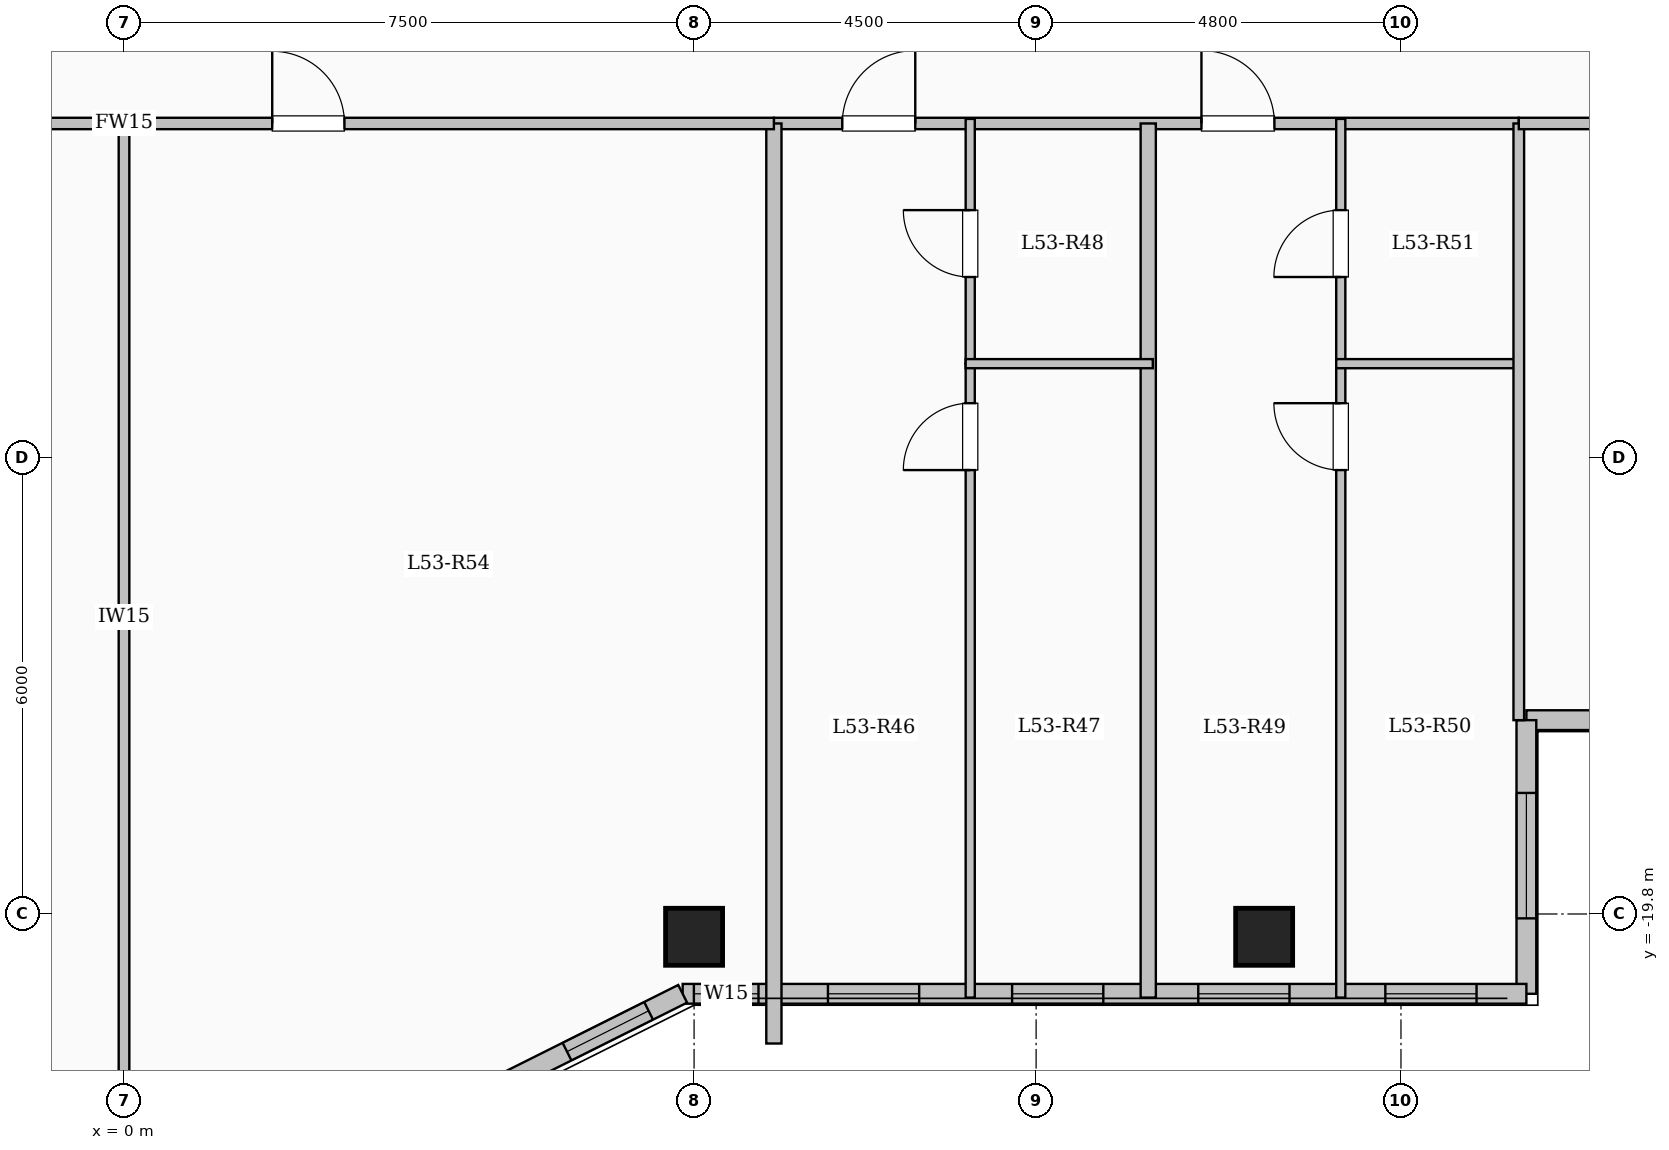
"""IFC4 building model, lengths in metres.
Left out: names, types, materials, properties, quantities, classifications, styles, units other than length and angle.
Written with IfcOpenShell. Run it as: python <this file> out.ifc"""

import sys

from ifc_helpers import new_model, si_unit, direction, frame, frame_2d, origin, origin_2d, place, context, subcontext, project, spatial, rectangle, extrude, element, fill, save


model = new_model("IFC4")
c1 = context("Model", 3, precision=1e-05, world=origin(), true_north=direction((0.0, 1.0)))
c2 = subcontext(c1, "Body", "Model", "MODEL_VIEW")
j1 = project(units=[si_unit("LENGTHUNIT", "METRE"), si_unit("PLANEANGLEUNIT", "RADIAN")], contexts=[c1])
p1 = place(None, origin())
s1 = spatial("IfcSite", under=j1, at=p1, CompositionType="ELEMENT")
p2 = place(p1, origin())
s2 = spatial("IfcBuilding", under=s1, at=p2, CompositionType="ELEMENT")
p3 = place(p2, frame((0.0, 0.0, 196.95)))
s3 = spatial("IfcBuildingStorey", under=s2, at=p3, CompositionType="ELEMENT", Elevation=196.95)
for number, where, z_axis, x_axis in (
    (1, (7.5, -20.1, 0.0), (0.0, 0.0, 1.0), (1.0, 0.0, 0.0)),
    (2, (15.0, -20.1, 0.0), (0.0, 0.0, 1.0), (1.0, 0.0, 0.0)),
):
    element("IfcColumn", number, at=place(p3, frame(where, z_axis=z_axis, x_axis=x_axis)), inside=s3, PredefinedType="COLUMN", context=c2, shape_type="SweptSolid", body=[
        extrude(rectangle(XDim=0.75, YDim=0.75, at=origin_2d()), origin(), (0.0, 0.0, 1.0), 3.35),
    ])
p4 = place(p3, frame((23.55, -17.25, 0.0), z_axis=(0.0, 0.0, 1.0), x_axis=(-1.0, 0.0, 0.0)))
e3 = element("IfcWall", 3, at=p4, inside=s3, PredefinedType="SOLIDWALL", context=c2, shape_type="SweptSolid", body=[
    extrude(rectangle(XDim=5.1, YDim=0.26, at=frame_2d((2.55, 0.0))), origin(), (0.0, 0.0, 1.0), 3.1),
])
p5 = place(p4, frame((1.475, 0.0, 0.9)))
e4 = element("IfcOpeningElement", 4, at=p5, cuts=e3, PredefinedType="OPENING", context=c2, shape_type="SweptSolid", body=[
    extrude(rectangle(XDim=2.2, YDim=1.75, at=frame_2d((1.1, 0.875))), frame((0.0, 0.14, 0.0), z_axis=(0.0, -1.0, 0.0), x_axis=(1.0, 0.0, 0.0)), (0.0, 0.0, 1.0), 0.28),
])
p6 = place(p3, frame((18.45, -17.25, 0.0), z_axis=(0.0, 0.0, 1.0), x_axis=(0.0, -1.0, 0.0)))
e5 = element("IfcWall", 5, at=p6, inside=s3, PredefinedType="SOLIDWALL", context=c2, shape_type="SweptSolid", body=[
    extrude(rectangle(XDim=3.6, YDim=0.26, at=frame_2d((1.8, 0.0))), origin(), (0.0, 0.0, 1.0), 3.1),
])
p7 = place(p6, frame((0.958, 0.0, 0.9)))
e6 = element("IfcOpeningElement", 6, at=p7, cuts=e5, PredefinedType="OPENING", context=c2, shape_type="SweptSolid", body=[
    extrude(rectangle(XDim=1.65, YDim=1.6, at=frame_2d((0.825, 0.8))), frame((0.0, 0.14, 0.0), z_axis=(0.0, -1.0, 0.0), x_axis=(1.0, 0.0, 0.0)), (0.0, 0.0, 1.0), 0.28),
])
p8 = place(p3, frame((18.45, -20.85, 0.0), z_axis=(0.0, 0.0, 1.0), x_axis=(-1.0, 0.0, 0.0)))
e7 = element("IfcWall", 7, at=p8, inside=s3, PredefinedType="SOLIDWALL", context=c2, shape_type="SweptSolid", body=[
    extrude(rectangle(XDim=11.1, YDim=0.26, at=frame_2d((5.55, 0.0))), origin(), (0.0, 0.0, 1.0), 3.1),
])
p9 = place(p8, frame((0.656, 0.0, 0.95)))
e8 = element("IfcOpeningElement", 8, at=p9, cuts=e7, PredefinedType="OPENING", context=c2, shape_type="SweptSolid", body=[
    extrude(rectangle(XDim=1.2, YDim=1.5, at=frame_2d((0.6, 0.75))), frame((0.0, 0.14, 0.0), z_axis=(0.0, -1.0, 0.0), x_axis=(1.0, 0.0, 0.0)), (0.0, 0.0, 1.0), 0.28),
])
p10 = place(p8, frame((3.117, 0.0, 0.95)))
e9 = element("IfcOpeningElement", 9, at=p10, cuts=e7, PredefinedType="OPENING", context=c2, shape_type="SweptSolid", body=[
    extrude(rectangle(XDim=1.2, YDim=1.5, at=frame_2d((0.6, 0.75))), frame((0.0, 0.14, 0.0), z_axis=(0.0, -1.0, 0.0), x_axis=(1.0, 0.0, 0.0)), (0.0, 0.0, 1.0), 0.28),
])
p11 = place(p8, frame((5.566, 0.0, 0.95)))
e10 = element("IfcOpeningElement", 10, at=p11, cuts=e7, PredefinedType="OPENING", context=c2, shape_type="SweptSolid", body=[
    extrude(rectangle(XDim=1.2, YDim=1.5, at=frame_2d((0.6, 0.75))), frame((0.0, 0.14, 0.0), z_axis=(0.0, -1.0, 0.0), x_axis=(1.0, 0.0, 0.0)), (0.0, 0.0, 1.0), 0.28),
])
p12 = place(p8, frame((7.989, 0.0, 0.95)))
e11 = element("IfcOpeningElement", 11, at=p12, cuts=e7, PredefinedType="OPENING", context=c2, shape_type="SweptSolid", body=[
    extrude(rectangle(XDim=1.2, YDim=1.5, at=frame_2d((0.6, 0.75))), frame((0.0, 0.14, 0.0), z_axis=(0.0, -1.0, 0.0), x_axis=(1.0, 0.0, 0.0)), (0.0, 0.0, 1.0), 0.28),
])
p13 = place(p8, frame((10.103, 0.0, 0.95)))
e12 = element("IfcOpeningElement", 12, at=p13, cuts=e7, PredefinedType="OPENING", context=c2, shape_type="SweptSolid", body=[
    extrude(rectangle(XDim=0.85, YDim=1.5, at=frame_2d((0.425, 0.75))), frame((0.0, 0.14, 0.0), z_axis=(0.0, -1.0, 0.0), x_axis=(1.0, 0.0, 0.0)), (0.0, 0.0, 1.0), 0.28),
])
p14 = place(p3, frame((7.35, -20.85, 0.0), z_axis=(0.0, 0.0, 1.0), x_axis=(-0.894427191, -0.4472135955, 0.0)))
e13 = element("IfcWall", 13, at=p14, inside=s3, PredefinedType="SOLIDWALL", context=c2, shape_type="SweptSolid", body=[
    extrude(rectangle(XDim=3.354, YDim=0.26, at=frame_2d((1.677, 0.0))), origin(), (0.0, 0.0, 1.0), 3.1),
])
p15 = place(p14, frame((0.501, 0.0, 0.95)))
e14 = element("IfcOpeningElement", 14, at=p15, cuts=e13, PredefinedType="OPENING", context=c2, shape_type="SweptSolid", body=[
    extrude(rectangle(XDim=1.2, YDim=1.5, at=frame_2d((0.6, 0.75))), frame((0.0, 0.14, 0.0), z_axis=(0.0, -1.0, 0.0), x_axis=(1.0, 0.0, 0.0)), (0.0, 0.0, 1.0), 0.28),
])
p16 = place(p3, frame((8.55, -9.4, 0.0), z_axis=(0.0, 0.0, 1.0), x_axis=(1.0, 0.0, 0.0)))
e15 = element("IfcWall", 15, at=p16, inside=s3, PredefinedType="PARTITIONING", context=c2, shape_type="SweptSolid", body=[
    extrude(rectangle(XDim=9.8, YDim=0.15, at=frame_2d((4.9, 0.0))), origin(), (0.0, 0.0, 1.0), 3.1),
])
p17 = place(p16, frame((0.9, 0.0, 0.0)))
e16 = element("IfcOpeningElement", 16, at=p17, cuts=e15, PredefinedType="OPENING", context=c2, shape_type="SweptSolid", body=[
    extrude(rectangle(XDim=0.96, YDim=2.15, at=frame_2d((0.48, 1.075))), frame((0.0, 0.085, 0.0), z_axis=(0.0, -1.0, 0.0), x_axis=(1.0, 0.0, 0.0)), (0.0, 0.0, 1.0), 0.17),
])
p18 = place(p16, frame((5.625, 0.0, 0.0)))
e17 = element("IfcOpeningElement", 17, at=p18, cuts=e15, PredefinedType="OPENING", context=c2, shape_type="SweptSolid", body=[
    extrude(rectangle(XDim=0.96, YDim=2.15, at=frame_2d((0.48, 1.075))), frame((0.0, 0.085, 0.0), z_axis=(0.0, -1.0, 0.0), x_axis=(1.0, 0.0, 0.0)), (0.0, 0.0, 1.0), 0.17),
])
p19 = place(p3, frame((13.475, -20.9, 0.0), z_axis=(0.0, 0.0, 1.0), x_axis=(0.0, 1.0, 0.0)))
e18 = element("IfcWall", 18, at=p19, inside=s3, PredefinedType="SOLIDWALL", context=c2, shape_type="SweptSolid", body=[
    extrude(rectangle(XDim=11.5, YDim=0.2, at=frame_2d((5.75, 0.0))), origin(), (0.0, 0.0, 1.0), 3.1),
])
p20 = place(p3, frame((11.133, -20.9, 0.0), z_axis=(0.0, 0.0, 1.0), x_axis=(0.0, 1.0, 0.0)))
e19 = element("IfcWall", 19, at=p20, inside=s3, PredefinedType="PARTITIONING", context=c2, shape_type="SweptSolid", body=[
    extrude(rectangle(XDim=8.34, YDim=0.12, at=frame_2d((4.17, 0.0))), origin(), (0.0, 0.0, 1.0), 3.1),
])
p21 = place(p20, frame((6.94, 0.0, 0.0)))
e20 = element("IfcOpeningElement", 20, at=p21, cuts=e19, PredefinedType="OPENING", context=c2, shape_type="SweptSolid", body=[
    extrude(rectangle(XDim=0.88, YDim=2.1, at=frame_2d((0.44, 1.05))), frame((0.0, 0.07, 0.0), z_axis=(0.0, -1.0, 0.0), x_axis=(1.0, 0.0, 0.0)), (0.0, 0.0, 1.0), 0.14),
])
p22 = place(p3, frame((11.133, -12.56, 0.0), z_axis=(0.0, 0.0, 1.0), x_axis=(0.0, 1.0, 0.0)))
e21 = element("IfcWall", 21, at=p22, inside=s3, PredefinedType="PARTITIONING", context=c2, shape_type="SweptSolid", body=[
    extrude(rectangle(XDim=3.22, YDim=0.12, at=frame_2d((1.61, 0.0))), origin(), (0.0, 0.0, 1.0), 3.1),
])
p23 = place(p22, frame((1.14, 0.0, 0.0)))
e22 = element("IfcOpeningElement", 22, at=p23, cuts=e21, PredefinedType="OPENING", context=c2, shape_type="SweptSolid", body=[
    extrude(rectangle(XDim=0.88, YDim=2.1, at=frame_2d((0.44, 1.05))), frame((0.0, 0.07, 0.0), z_axis=(0.0, -1.0, 0.0), x_axis=(1.0, 0.0, 0.0)), (0.0, 0.0, 1.0), 0.14),
])
p24 = place(p3, frame((11.073, -12.56, 0.0), z_axis=(0.0, 0.0, 1.0), x_axis=(1.0, 0.0, 0.0)))
e23 = element("IfcWall", 23, at=p24, inside=s3, PredefinedType="PARTITIONING", context=c2, shape_type="SweptSolid", body=[
    extrude(rectangle(XDim=2.462, YDim=0.12, at=frame_2d((1.231, 0.0))), origin(), (0.0, 0.0, 1.0), 2.725),
])
p25 = place(p3, frame((16.008, -20.9, 0.0), z_axis=(0.0, 0.0, 1.0), x_axis=(0.0, 1.0, 0.0)))
e24 = element("IfcWall", 24, at=p25, inside=s3, PredefinedType="PARTITIONING", context=c2, shape_type="SweptSolid", body=[
    extrude(rectangle(XDim=8.34, YDim=0.12, at=frame_2d((4.17, 0.0))), origin(), (0.0, 0.0, 1.0), 3.1),
])
p26 = place(p25, frame((6.94, 0.0, 0.0)))
e25 = element("IfcOpeningElement", 25, at=p26, cuts=e24, PredefinedType="OPENING", context=c2, shape_type="SweptSolid", body=[
    extrude(rectangle(XDim=0.88, YDim=2.1, at=frame_2d((0.44, 1.05))), frame((0.0, 0.07, 0.0), z_axis=(0.0, -1.0, 0.0), x_axis=(1.0, 0.0, 0.0)), (0.0, 0.0, 1.0), 0.14),
])
p27 = place(p3, frame((16.008, -12.56, 0.0), z_axis=(0.0, 0.0, 1.0), x_axis=(0.0, 1.0, 0.0)))
e26 = element("IfcWall", 26, at=p27, inside=s3, PredefinedType="PARTITIONING", context=c2, shape_type="SweptSolid", body=[
    extrude(rectangle(XDim=3.22, YDim=0.12, at=frame_2d((1.61, 0.0))), origin(), (0.0, 0.0, 1.0), 3.1),
])
p28 = place(p27, frame((1.14, 0.0, 0.0)))
e27 = element("IfcOpeningElement", 27, at=p28, cuts=e26, PredefinedType="OPENING", context=c2, shape_type="SweptSolid", body=[
    extrude(rectangle(XDim=0.88, YDim=2.1, at=frame_2d((0.44, 1.05))), frame((0.0, 0.07, 0.0), z_axis=(0.0, -1.0, 0.0), x_axis=(1.0, 0.0, 0.0)), (0.0, 0.0, 1.0), 0.14),
])
p29 = place(p3, frame((15.948, -12.56, 0.0), z_axis=(0.0, 0.0, 1.0), x_axis=(1.0, 0.0, 0.0)))
e28 = element("IfcWall", 28, at=p29, inside=s3, PredefinedType="PARTITIONING", context=c2, shape_type="SweptSolid", body=[
    extrude(rectangle(XDim=2.462, YDim=0.12, at=frame_2d((1.231, 0.0))), origin(), (0.0, 0.0, 1.0), 3.1),
])
p30 = place(p3, frame((8.55, -21.504, 0.0), z_axis=(0.0, 0.0, 1.0), x_axis=(0.0, 1.0, 0.0)))
e29 = element("IfcWall", 29, at=p30, inside=s3, PredefinedType="SOLIDWALL", context=c2, shape_type="SweptSolid", body=[
    extrude(rectangle(XDim=12.104, YDim=0.2, at=frame_2d((6.052, 0.0))), origin(), (0.0, 0.0, 1.0), 3.1),
])
p31 = place(p3, frame((-8.55, -9.4, 0.0), z_axis=(0.0, 0.0, 1.0), x_axis=(1.0, 0.0, 0.0)))
e30 = element("IfcWall", 30, at=p31, inside=s3, PredefinedType="PARTITIONING", context=c2, shape_type="SweptSolid", body=[
    extrude(rectangle(XDim=17.1, YDim=0.15, at=frame_2d((8.55, 0.0))), origin(), (0.0, 0.0, 1.0), 3.1),
])
p32 = place(p31, frame((1.9, 0.0, 0.0)))
e31 = element("IfcOpeningElement", 31, at=p32, cuts=e30, PredefinedType="OPENING", context=c2, shape_type="SweptSolid", body=[
    extrude(rectangle(XDim=0.95, YDim=2.15, at=frame_2d((0.475, 1.075))), frame((0.0, 0.085, 0.0), z_axis=(0.0, -1.0, 0.0), x_axis=(1.0, 0.0, 0.0)), (0.0, 0.0, 1.0), 0.17),
])
p33 = place(p31, frame((10.5, 0.0, 0.0)))
e32 = element("IfcOpeningElement", 32, at=p33, cuts=e30, PredefinedType="OPENING", context=c2, shape_type="SweptSolid", body=[
    extrude(rectangle(XDim=0.95, YDim=2.15, at=frame_2d((0.475, 1.075))), frame((0.0, 0.085, 0.0), z_axis=(0.0, -1.0, 0.0), x_axis=(1.0, 0.0, 0.0)), (0.0, 0.0, 1.0), 0.17),
])
p34 = place(p3, frame((0.0, -22.38, 0.0), z_axis=(0.0, 0.0, 1.0), x_axis=(0.0, 1.0, 0.0)))
e33 = element("IfcWall", 33, at=p34, inside=s3, PredefinedType="PARTITIONING", context=c2, shape_type="SweptSolid", body=[
    extrude(rectangle(XDim=12.98, YDim=0.14, at=frame_2d((6.49, 0.0))), origin(), (0.0, 0.0, 1.0), 3.1),
])
p35 = place(p3, frame((18.35, -17.25, 0.0), z_axis=(0.0, 0.0, 1.0), x_axis=(0.0, 1.0, 0.0)))
e34 = element("IfcWall", 34, at=p35, inside=s3, PredefinedType="PARTITIONING", context=c2, shape_type="SweptSolid", body=[
    extrude(rectangle(XDim=7.85, YDim=0.14, at=frame_2d((3.925, 0.0))), origin(), (0.0, 0.0, 1.0), 3.1),
])
p36 = place(p3, frame((18.35, -9.4, 0.0), z_axis=(0.0, 0.0, 1.0), x_axis=(1.0, 0.0, 0.0)))
e35 = element("IfcWall", 35, at=p36, inside=s3, PredefinedType="PARTITIONING", context=c2, shape_type="SweptSolid", body=[
    extrude(rectangle(XDim=5.23, YDim=0.15, at=frame_2d((2.615, 0.0))), origin(), (0.0, 0.0, 1.0), 3.1),
])
p37 = place(p36, frame((2.14, 0.0, 0.0)))
e36 = element("IfcOpeningElement", 36, at=p37, cuts=e35, PredefinedType="OPENING", context=c2, shape_type="SweptSolid", body=[
    extrude(rectangle(XDim=0.95, YDim=2.15, at=frame_2d((0.475, 1.075))), frame((0.0, 0.085, 0.0), z_axis=(0.0, -1.0, 0.0), x_axis=(1.0, 0.0, 0.0)), (0.0, 0.0, 1.0), 0.17),
])
p38 = place(p7, origin())
e37 = element("IfcWindow", 37, at=p38, inside=s3, PartitioningType="SINGLE_PANEL", PredefinedType="WINDOW", context=c2, shape_type="SweptSolid", body=[
    extrude(rectangle(XDim=1.65, YDim=1.6, at=frame_2d((0.825, 0.8))), frame((0.0, 0.03, 0.0), z_axis=(0.0, -1.0, 0.0), x_axis=(1.0, 0.0, 0.0)), (0.0, 0.0, 1.0), 0.06),
])
fill(e6, e37)
p39 = place(p9, origin())
e38 = element("IfcWindow", 38, at=p39, inside=s3, PartitioningType="SINGLE_PANEL", PredefinedType="WINDOW", context=c2, shape_type="SweptSolid", body=[
    extrude(rectangle(XDim=1.2, YDim=1.5, at=frame_2d((0.6, 0.75))), frame((0.0, 0.03, 0.0), z_axis=(0.0, -1.0, 0.0), x_axis=(1.0, 0.0, 0.0)), (0.0, 0.0, 1.0), 0.06),
])
fill(e8, e38)
p40 = place(p10, origin())
e39 = element("IfcWindow", 39, at=p40, inside=s3, PartitioningType="SINGLE_PANEL", PredefinedType="WINDOW", context=c2, shape_type="SweptSolid", body=[
    extrude(rectangle(XDim=1.2, YDim=1.5, at=frame_2d((0.6, 0.75))), frame((0.0, 0.03, 0.0), z_axis=(0.0, -1.0, 0.0), x_axis=(1.0, 0.0, 0.0)), (0.0, 0.0, 1.0), 0.06),
])
fill(e9, e39)
p41 = place(p11, origin())
e40 = element("IfcWindow", 40, at=p41, inside=s3, PartitioningType="SINGLE_PANEL", PredefinedType="WINDOW", context=c2, shape_type="SweptSolid", body=[
    extrude(rectangle(XDim=1.2, YDim=1.5, at=frame_2d((0.6, 0.75))), frame((0.0, 0.03, 0.0), z_axis=(0.0, -1.0, 0.0), x_axis=(1.0, 0.0, 0.0)), (0.0, 0.0, 1.0), 0.06),
])
fill(e10, e40)
p42 = place(p12, origin())
e41 = element("IfcWindow", 41, at=p42, inside=s3, PartitioningType="SINGLE_PANEL", PredefinedType="WINDOW", context=c2, shape_type="SweptSolid", body=[
    extrude(rectangle(XDim=1.2, YDim=1.5, at=frame_2d((0.6, 0.75))), frame((0.0, 0.03, 0.0), z_axis=(0.0, -1.0, 0.0), x_axis=(1.0, 0.0, 0.0)), (0.0, 0.0, 1.0), 0.06),
])
fill(e11, e41)
p43 = place(p13, origin())
e42 = element("IfcWindow", 42, at=p43, inside=s3, PartitioningType="SINGLE_PANEL", PredefinedType="WINDOW", context=c2, shape_type="SweptSolid", body=[
    extrude(rectangle(XDim=0.85, YDim=1.5, at=frame_2d((0.425, 0.75))), frame((0.0, 0.03, 0.0), z_axis=(0.0, -1.0, 0.0), x_axis=(1.0, 0.0, 0.0)), (0.0, 0.0, 1.0), 0.06),
])
fill(e12, e42)
p44 = place(p15, origin())
e43 = element("IfcWindow", 43, at=p44, inside=s3, PartitioningType="SINGLE_PANEL", PredefinedType="WINDOW", context=c2, shape_type="SweptSolid", body=[
    extrude(rectangle(XDim=1.2, YDim=1.5, at=frame_2d((0.6, 0.75))), frame((0.0, 0.03, 0.0), z_axis=(0.0, -1.0, 0.0), x_axis=(1.0, 0.0, 0.0)), (0.0, 0.0, 1.0), 0.06),
])
fill(e14, e43)
p45 = place(p17, origin())
e44 = element("IfcDoor", 44, at=p45, inside=s3, OperationType="SINGLE_SWING_RIGHT", PredefinedType="DOOR", context=c2, shape_type="SweptSolid", body=[
    extrude(rectangle(XDim=0.96, YDim=2.15, at=frame_2d((0.48, 1.075))), frame((0.0, 0.025, 0.0), z_axis=(0.0, -1.0, 0.0), x_axis=(1.0, 0.0, 0.0)), (0.0, 0.0, 1.0), 0.05),
])
fill(e16, e44)
p46 = place(p21, origin())
e45 = element("IfcDoor", 45, at=p46, inside=s3, OperationType="SINGLE_SWING_LEFT", PredefinedType="DOOR", context=c2, shape_type="SweptSolid", body=[
    extrude(rectangle(XDim=0.88, YDim=2.1, at=frame_2d((0.44, 1.05))), frame((0.0, 0.025, 0.0), z_axis=(0.0, -1.0, 0.0), x_axis=(1.0, 0.0, 0.0)), (0.0, 0.0, 1.0), 0.05),
])
fill(e20, e45)
p47 = place(p23, origin())
e46 = element("IfcDoor", 46, at=p47, inside=s3, OperationType="SINGLE_SWING_RIGHT", PredefinedType="DOOR", context=c2, shape_type="SweptSolid", body=[
    extrude(rectangle(XDim=0.88, YDim=2.1, at=frame_2d((0.44, 1.05))), frame((0.0, 0.025, 0.0), z_axis=(0.0, -1.0, 0.0), x_axis=(1.0, 0.0, 0.0)), (0.0, 0.0, 1.0), 0.05),
])
fill(e22, e46)
p48 = place(p18, origin())
e47 = element("IfcDoor", 47, at=p48, inside=s3, OperationType="SINGLE_SWING_LEFT", PredefinedType="DOOR", context=c2, shape_type="SweptSolid", body=[
    extrude(rectangle(XDim=0.96, YDim=2.15, at=frame_2d((0.48, 1.075))), frame((0.0, 0.025, 0.0), z_axis=(0.0, -1.0, 0.0), x_axis=(1.0, 0.0, 0.0)), (0.0, 0.0, 1.0), 0.05),
])
fill(e17, e47)
p49 = place(p26, origin())
e48 = element("IfcDoor", 48, at=p49, inside=s3, OperationType="SINGLE_SWING_RIGHT", PredefinedType="DOOR", context=c2, shape_type="SweptSolid", body=[
    extrude(rectangle(XDim=0.88, YDim=2.1, at=frame_2d((0.44, 1.05))), frame((0.0, 0.025, 0.0), z_axis=(0.0, -1.0, 0.0), x_axis=(1.0, 0.0, 0.0)), (0.0, 0.0, 1.0), 0.05),
])
fill(e25, e48)
p50 = place(p28, origin())
e49 = element("IfcDoor", 49, at=p50, inside=s3, OperationType="SINGLE_SWING_LEFT", PredefinedType="DOOR", context=c2, shape_type="SweptSolid", body=[
    extrude(rectangle(XDim=0.88, YDim=2.1, at=frame_2d((0.44, 1.05))), frame((0.0, 0.025, 0.0), z_axis=(0.0, -1.0, 0.0), x_axis=(1.0, 0.0, 0.0)), (0.0, 0.0, 1.0), 0.05),
])
fill(e27, e49)
p51 = place(p33, origin())
e50 = element("IfcDoor", 50, at=p51, inside=s3, OperationType="SINGLE_SWING_LEFT", PredefinedType="DOOR", context=c2, shape_type="SweptSolid", body=[
    extrude(rectangle(XDim=0.95, YDim=2.15, at=frame_2d((0.475, 1.075))), frame((0.0, 0.025, 0.0), z_axis=(0.0, -1.0, 0.0), x_axis=(1.0, 0.0, 0.0)), (0.0, 0.0, 1.0), 0.05),
])
fill(e32, e50)
save(model, sys.argv[1])
